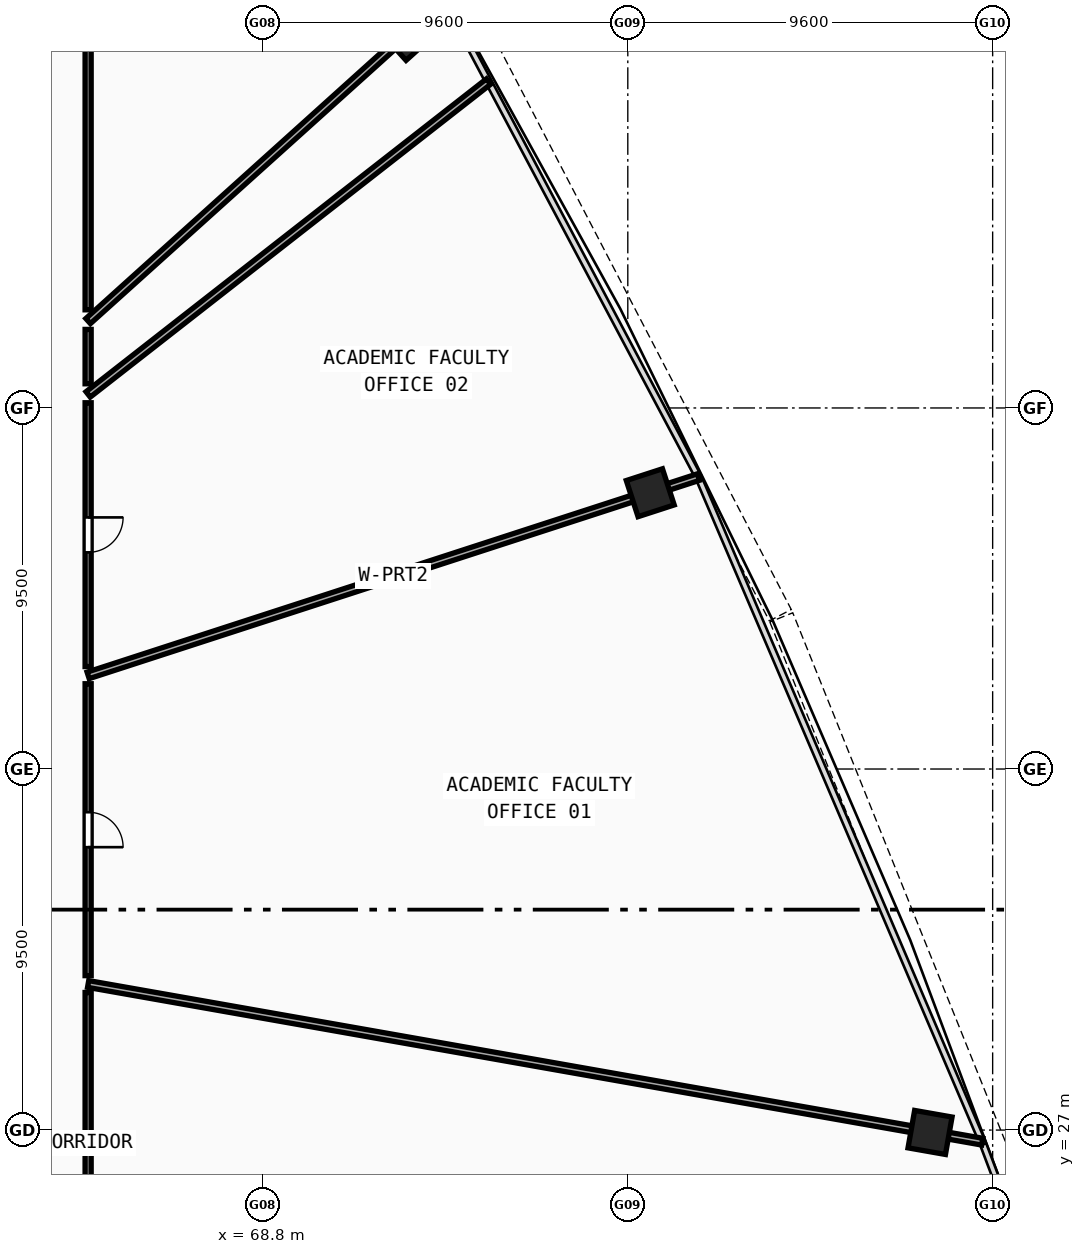
"""IFC4 building model, lengths in metres.
Left out: names, types, materials, properties, quantities, classifications, styles, units other than length and angle.
Written with IfcOpenShell. Run it as: python <this file> out.ifc"""

import sys

from ifc_helpers import new_model, si_unit, direction, frame, frame_2d, origin, origin_with_axes, origin_2d, place, context, subcontext, project, spatial, rectangle, hollow_rectangle, extrude, source, transform, mapped, element, fill, save


model = new_model("IFC4")
c1 = context("Model", 3, precision=1e-05, world=origin(), true_north=direction((0.0, 1.0)))
c2 = subcontext(c1, "Body", "Model", "MODEL_VIEW")
j1 = project(units=[si_unit("LENGTHUNIT", "METRE"), si_unit("PLANEANGLEUNIT", "RADIAN")], contexts=[c1])
p1 = place(None, origin())
s1 = spatial("IfcSite", under=j1, at=p1, CompositionType="ELEMENT")
p2 = place(p1, origin())
s2 = spatial("IfcBuilding", under=s1, at=p2, CompositionType="ELEMENT")
p3 = place(p2, frame((0.0, 0.0, 111.58)))
s3 = spatial("IfcBuildingStorey", under=s2, at=p3, CompositionType="ELEMENT", Elevation=111.58)
m1 = source(origin(), c2, "Body", "SweptSolid", [
    extrude(hollow_rectangle(XDim=1.0, YDim=1.0, WallThickness=0.042, at=origin_2d()), origin(), (0.0, 0.0, 1.0), 3.8),
])
for number, where, z_axis, x_axis in (
    (1, (86.353, 26.938, -0.26), (0.0, 0.0, 1.0), (0.174, 0.985, 0.0)),
    (2, (78.991, 43.77, -0.26), (0.0, 0.0, 1.0), (-0.309, 0.951, 0.0)),
    (3, (72.603, 55.852, -0.26), (0.0, 0.0, 1.0), (-0.669, 0.743, 0.0)),
):
    element("IfcColumn", number, at=place(p3, frame(where, z_axis=z_axis, x_axis=x_axis)), inside=s3, PredefinedType="COLUMN", context=c2, shape_type="MappedRepresentation", body=[
        mapped(m1, transform((0.0, 0.0, 0.0), scale=1.0)),
    ])
p4 = place(p3, frame((64.2, 38.964, 0.0), z_axis=(0.0, 0.0, 1.0), x_axis=(0.951054786835, 0.309022317054, 0.0)))
e4 = element("IfcWall", 4, at=p4, inside=s3, PredefinedType="PARTITIONING", context=c2, shape_type="SweptSolid", body=[
    extrude(rectangle(XDim=16.885, YDim=0.18, at=frame_2d((8.442, 0.0))), origin(), (0.0, 0.0, 1.0), 2.84),
])
p5 = place(p3, frame((64.2, 46.357, 0.0), z_axis=(0.0, 0.0, 1.0), x_axis=(0.788007209352, 0.615666011738, 0.0)))
e5 = element("IfcWall", 5, at=p5, inside=s3, PredefinedType="PARTITIONING", context=c2, shape_type="SweptSolid", body=[
    extrude(rectangle(XDim=13.37, YDim=0.18, at=frame_2d((6.685, 0.0))), origin(), (0.0, 0.0, 1.0), 2.84),
])
p6 = place(p3, frame((64.2, 48.287, 0.0), z_axis=(0.0, 0.0, 1.0), x_axis=(0.743140441227, 0.66913547553, 0.0)))
e6 = element("IfcWall", 6, at=p6, inside=s3, PredefinedType="PARTITIONING", context=c2, shape_type="SweptSolid", body=[
    extrude(rectangle(XDim=12.638, YDim=0.18, at=frame_2d((6.319, 0.0))), origin(), (0.0, 0.0, 1.0), 2.84),
])
p7 = place(p3, frame((64.2, 30.844, 0.0), z_axis=(0.0, 0.0, 1.0), x_axis=(0.98480783024, -0.173647739683, 0.0)))
e7 = element("IfcWall", 7, at=p7, inside=s3, PredefinedType="PARTITIONING", context=c2, shape_type="SweptSolid", body=[
    extrude(rectangle(XDim=23.889, YDim=0.18, at=frame_2d((11.944, 0.0))), origin(), (0.0, 0.0, 1.0), 2.84),
])
p8 = place(p3, frame((64.2, 55.8, 0.0), z_axis=(0.0, 0.0, 1.0), x_axis=(0.0, -1.0, 0.0)))
e8 = element("IfcWall", 8, at=p8, inside=s3, PredefinedType="PARTITIONING", context=c2, shape_type="SweptSolid", body=[
    extrude(rectangle(XDim=7.218, YDim=0.16, at=frame_2d((3.609, 0.0))), origin(), (0.0, 0.0, 1.0), 3.14),
])
p9 = place(p3, frame((64.2, 48.067, 0.0), z_axis=(0.0, 0.0, 1.0), x_axis=(0.0, -1.0, 0.0)))
e9 = element("IfcWall", 9, at=p9, inside=s3, PredefinedType="PARTITIONING", context=c2, shape_type="SweptSolid", body=[
    extrude(rectangle(XDim=1.431, YDim=0.16, at=frame_2d((0.715, 0.0))), origin(), (0.0, 0.0, 1.0), 2.84),
])
p10 = place(p3, frame((64.2, 46.137, 0.0), z_axis=(0.0, 0.0, 1.0), x_axis=(0.0, -1.0, 0.0)))
e10 = element("IfcWall", 10, at=p10, inside=s3, PredefinedType="PARTITIONING", context=c2, shape_type="SweptSolid", body=[
    extrude(rectangle(XDim=6.942, YDim=0.16, at=frame_2d((3.471, 0.0))), origin(), (0.0, 0.0, 1.0), 3.14),
])
p11 = place(p10, frame((3.017, 0.0, 0.0)))
e11 = element("IfcOpeningElement", 11, at=p11, cuts=e10, PredefinedType="OPENING", context=c2, shape_type="SweptSolid", body=[
    extrude(rectangle(XDim=0.92, YDim=2.1, at=frame_2d((0.46, 1.05))), frame((0.0, 0.09, 0.0), z_axis=(0.0, -1.0, 0.0), x_axis=(1.0, 0.0, 0.0)), (0.0, 0.0, 1.0), 0.18),
])
p12 = place(p3, frame((64.2, 38.744, 0.0), z_axis=(0.0, 0.0, 1.0), x_axis=(0.0, -1.0, 0.0)))
e12 = element("IfcWall", 12, at=p12, inside=s3, PredefinedType="PARTITIONING", context=c2, shape_type="SweptSolid", body=[
    extrude(rectangle(XDim=7.681, YDim=0.16, at=frame_2d((3.84, 0.0))), origin(), (0.0, 0.0, 1.0), 3.54),
])
p13 = place(p12, frame((3.38, 0.0, 0.0)))
e13 = element("IfcOpeningElement", 13, at=p13, cuts=e12, PredefinedType="OPENING", context=c2, shape_type="SweptSolid", body=[
    extrude(rectangle(XDim=0.92, YDim=2.1, at=frame_2d((0.46, 1.05))), frame((0.0, 0.09, 0.0), z_axis=(0.0, -1.0, 0.0), x_axis=(1.0, 0.0, 0.0)), (0.0, 0.0, 1.0), 0.18),
])
p14 = place(p3, frame((64.2, 30.62, 0.0), z_axis=(0.0, 0.0, 1.0), x_axis=(0.0, -1.0, 0.0)))
e14 = element("IfcWall", 14, at=p14, inside=s3, PredefinedType="PARTITIONING", context=c2, shape_type="SweptSolid", body=[
    extrude(rectangle(XDim=5.82, YDim=0.16, at=frame_2d((2.91, 0.0))), origin(), (0.0, 0.0, 1.0), 3.14),
])
m2 = source(origin(), c2, "Body", "SweptSolid", [
    extrude(rectangle(XDim=0.92, YDim=2.1, at=frame_2d((0.46, 1.05))), frame((0.0, 0.025, 0.0), z_axis=(0.0, -1.0, 0.0), x_axis=(1.0, 0.0, 0.0)), (0.0, 0.0, 1.0), 0.05),
])
p15 = place(p13, origin_with_axes())
e15 = element("IfcDoor", 15, at=p15, inside=s3, OperationType="SINGLE_SWING_RIGHT", PredefinedType="DOOR", context=c2, shape_type="MappedRepresentation", body=[
    mapped(m2, transform((0.0, 0.0, 0.0), scale=1.0)),
])
fill(e13, e15)
p16 = place(p11, origin_with_axes())
e16 = element("IfcDoor", 16, at=p16, inside=s3, OperationType="SINGLE_SWING_LEFT", PredefinedType="DOOR", context=c2, shape_type="MappedRepresentation", body=[
    mapped(m2, transform((0.0, 0.0, 0.0), scale=1.0)),
])
fill(e11, e16)
save(model, sys.argv[1])
